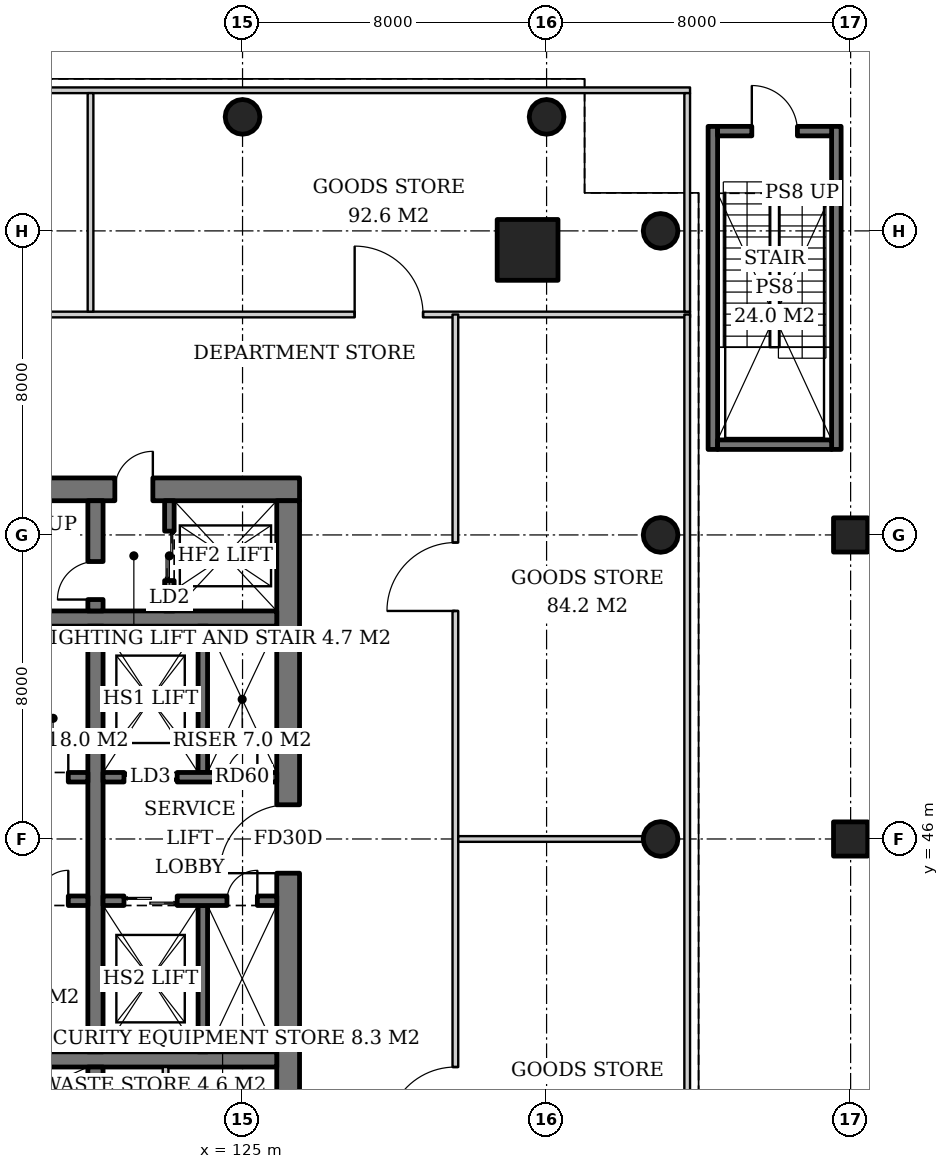
"""IFC4 building model, lengths in metres.
Left out: names, types, materials, properties, quantities, classifications, styles, units other than length and angle.
Written with IfcOpenShell. Run it as: python <this file> out.ifc"""

import sys

from ifc_helpers import new_model, si_unit, direction, frame, frame_2d, origin, origin_2d, place, context, subcontext, project, spatial, rectangle, hollow_circle, extrude, element, fill, save


model = new_model("IFC4")
c1 = context("Model", 3, precision=1e-05, world=origin(), true_north=direction((0.0, 1.0)))
c2 = subcontext(c1, "Body", "Model", "MODEL_VIEW")
j1 = project(units=[si_unit("LENGTHUNIT", "METRE"), si_unit("PLANEANGLEUNIT", "RADIAN")], contexts=[c1])
p1 = place(None, origin())
s1 = spatial("IfcSite", under=j1, at=p1, CompositionType="ELEMENT")
p2 = place(p1, origin())
s2 = spatial("IfcBuilding", under=s1, at=p2, CompositionType="ELEMENT")
p3 = place(p2, frame((0.0, 0.0, 6.0)))
s3 = spatial("IfcBuildingStorey", under=s2, at=p3, CompositionType="ELEMENT", Elevation=6.0)
for number, where, z_axis, x_axis in (
    (1, (141.0, 46.0, 0.0), (0.0, 0.0, 1.0), (1.0, 0.0, 0.0)),
    (2, (141.0, 54.0, 0.0), (0.0, 0.0, 1.0), (1.0, 0.0, 0.0)),
):
    element("IfcColumn", number, at=place(p3, frame(where, z_axis=z_axis, x_axis=x_axis)), inside=s3, PredefinedType="COLUMN", context=c2, shape_type="SweptSolid", body=[
        extrude(rectangle(XDim=0.9, YDim=0.9, at=origin_2d()), origin(), (0.0, 0.0, 1.0), 5.0),
    ])
p4 = place(p3, frame((132.5, 61.5, 0.0), z_axis=(0.0, 0.0, 1.0), x_axis=(1.0, 0.0, 0.0)))
e3 = element("IfcColumn", 3, at=p4, inside=s3, PredefinedType="COLUMN", context=c2, shape_type="SweptSolid", body=[
    extrude(rectangle(XDim=1.6, YDim=1.6, at=origin_2d()), origin(), (0.0, 0.0, 1.0), 5.0),
])
for number, where, z_axis, x_axis in (
    (4, (136.0, 62.0, 0.0), (0.0, 0.0, 1.0), (1.0, 0.0, 0.0)),
    (5, (136.0, 46.0, 0.0), (0.0, 0.0, 1.0), (1.0, 0.0, 0.0)),
    (6, (136.0, 54.0, 0.0), (0.0, 0.0, 1.0), (1.0, 0.0, 0.0)),
    (7, (133.0, 65.0, 0.0), (0.0, 0.0, 1.0), (1.0, 0.0, 0.0)),
    (8, (125.0, 65.0, 0.0), (0.0, 0.0, 1.0), (1.0, 0.0, 0.0)),
):
    element("IfcColumn", number, at=place(p3, frame(where, z_axis=z_axis, x_axis=x_axis)), inside=s3, PredefinedType="COLUMN", context=c2, shape_type="SweptSolid", body=[
        extrude(hollow_circle(Radius=0.457, WallThickness=0.03, at=origin_2d()), origin(), (0.0, 0.0, 1.0), 5.0),
    ])
p5 = place(p3, frame((107.5, 55.2, 0.0), z_axis=(0.0, 0.0, 1.0), x_axis=(1.0, 0.0, 0.0)))
e9 = element("IfcWall", 9, at=p5, inside=s3, PredefinedType="SHEAR", context=c2, shape_type="SweptSolid", body=[
    extrude(rectangle(XDim=19.0, YDim=0.6, at=frame_2d((9.5, 0.0))), origin(), (0.0, 0.0, 1.0), 5.0),
])
p6 = place(p5, frame((14.14, 0.0, 0.0)))
e10 = element("IfcOpeningElement", 10, at=p6, cuts=e9, PredefinedType="OPENING", context=c2, shape_type="SweptSolid", body=[
    extrude(rectangle(XDim=1.0, YDim=2.1, at=frame_2d((0.5, 1.05))), frame((0.0, 0.31, 0.0), z_axis=(0.0, -1.0, 0.0), x_axis=(1.0, 0.0, 0.0)), (0.0, 0.0, 1.0), 0.62),
])
p7 = place(p5, frame((2.425, 0.0, 0.0)))
e11 = element("IfcOpeningElement", 11, at=p7, cuts=e9, PredefinedType="OPENING", context=c2, shape_type="SweptSolid", body=[
    extrude(rectangle(XDim=1.0, YDim=2.1, at=frame_2d((0.5, 1.05))), frame((0.0, 0.31, 0.0), z_axis=(0.0, -1.0, 0.0), x_axis=(1.0, 0.0, 0.0)), (0.0, 0.0, 1.0), 0.62),
])
p8 = place(p3, frame((126.2, 37.1, 0.0), z_axis=(0.0, 0.0, 1.0), x_axis=(0.0, 1.0, 0.0)))
e12 = element("IfcWall", 12, at=p8, inside=s3, PredefinedType="SHEAR", context=c2, shape_type="SweptSolid", body=[
    extrude(rectangle(XDim=17.8, YDim=0.6, at=frame_2d((8.9, 0.0))), origin(), (0.0, 0.0, 1.0), 5.0),
])
p9 = place(p8, frame((8.0, 0.0, 0.0)))
e13 = element("IfcOpeningElement", 13, at=p9, cuts=e12, PredefinedType="OPENING", context=c2, shape_type="SweptSolid", body=[
    extrude(rectangle(XDim=1.8, YDim=2.4, at=frame_2d((0.9, 1.2))), frame((0.0, 0.31, 0.0), z_axis=(0.0, -1.0, 0.0), x_axis=(1.0, 0.0, 0.0)), (0.0, 0.0, 1.0), 0.62),
])
for number, where, z_axis, x_axis in (
    (14, (108.1, 40.2, 0.0), (0.0, 0.0, 1.0), (1.0, 0.0, 0.0)),
    (15, (108.1, 51.8, 0.0), (0.0, 0.0, 1.0), (1.0, 0.0, 0.0)),
):
    element("IfcWall", number, at=place(p3, frame(where, z_axis=z_axis, x_axis=x_axis)), inside=s3, PredefinedType="SHEAR", context=c2, shape_type="SweptSolid", body=[
        extrude(rectangle(XDim=17.8, YDim=0.4, at=frame_2d((8.9, 0.0))), origin(), (0.0, 0.0, 1.0), 5.0),
    ])
p10 = place(p3, frame((121.13, 37.1, 0.0), z_axis=(0.0, 0.0, 1.0), x_axis=(0.0, 1.0, 0.0)))
e16 = element("IfcWall", 16, at=p10, inside=s3, PredefinedType="SHEAR", context=c2, shape_type="SweptSolid", body=[
    extrude(rectangle(XDim=2.9, YDim=0.4, at=frame_2d((1.45, 0.0))), origin(), (0.0, 0.0, 1.0), 5.0),
])
p11 = place(p3, frame((121.13, 40.4, 0.0), z_axis=(0.0, 0.0, 1.0), x_axis=(0.0, 1.0, 0.0)))
e17 = element("IfcWall", 17, at=p11, inside=s3, PredefinedType="SHEAR", context=c2, shape_type="SweptSolid", body=[
    extrude(rectangle(XDim=11.2, YDim=0.4, at=frame_2d((5.6, 0.0))), origin(), (0.0, 0.0, 1.0), 5.0),
])
p12 = place(p3, frame((121.13, 52.0, 0.0), z_axis=(0.0, 0.0, 1.0), x_axis=(0.0, 1.0, 0.0)))
e18 = element("IfcWall", 18, at=p12, inside=s3, PredefinedType="SHEAR", context=c2, shape_type="SweptSolid", body=[
    extrude(rectangle(XDim=2.9, YDim=0.4, at=frame_2d((1.45, 0.0))), origin(), (0.0, 0.0, 1.0), 5.0),
])
p13 = place(p12, frame((0.3, 0.0, 0.0)))
e19 = element("IfcOpeningElement", 19, at=p13, cuts=e18, PredefinedType="OPENING", context=c2, shape_type="SweptSolid", body=[
    extrude(rectangle(XDim=1.0, YDim=2.1, at=frame_2d((0.5, 1.05))), frame((0.0, 0.21, 0.0), z_axis=(0.0, -1.0, 0.0), x_axis=(1.0, 0.0, 0.0)), (0.0, 0.0, 1.0), 0.42),
])
p14 = place(p3, frame((123.075, 52.0, 0.0), z_axis=(0.0, 0.0, 1.0), x_axis=(0.0, 1.0, 0.0)))
e20 = element("IfcWall", 20, at=p14, inside=s3, PredefinedType="SHEAR", context=c2, shape_type="SweptSolid", body=[
    extrude(rectangle(XDim=2.9, YDim=0.25, at=frame_2d((1.45, 0.0))), origin(), (0.0, 0.0, 1.0), 5.0),
])
p15 = place(p14, frame((0.8, 0.0, 0.0)))
e21 = element("IfcOpeningElement", 21, at=p15, cuts=e20, PredefinedType="OPENING", context=c2, shape_type="SweptSolid", body=[
    extrude(rectangle(XDim=1.3, YDim=2.2, at=frame_2d((0.65, 1.1))), frame((0.0, 0.135, 0.0), z_axis=(0.0, -1.0, 0.0), x_axis=(1.0, 0.0, 0.0)), (0.0, 0.0, 1.0), 0.27),
])
p16 = place(p3, frame((108.1, 47.625, 0.0), z_axis=(0.0, 0.0, 1.0), x_axis=(1.0, 0.0, 0.0)))
e22 = element("IfcWall", 22, at=p16, inside=s3, PredefinedType="SHEAR", context=c2, shape_type="SweptSolid", body=[
    extrude(rectangle(XDim=12.83, YDim=0.25, at=frame_2d((6.415, 0.0))), origin(), (0.0, 0.0, 1.0), 5.0),
])
p17 = place(p16, frame((11.515, 0.0, 0.0)))
e23 = element("IfcOpeningElement", 23, at=p17, cuts=e22, PredefinedType="OPENING", context=c2, shape_type="SweptSolid", body=[
    extrude(rectangle(XDim=0.8, YDim=2.0, at=frame_2d((0.4, 1.0))), frame((0.0, 0.135, 0.0), z_axis=(0.0, -1.0, 0.0), x_axis=(1.0, 0.0, 0.0)), (0.0, 0.0, 1.0), 0.27),
])
p18 = place(p3, frame((108.1, 44.375, 0.0), z_axis=(0.0, 0.0, 1.0), x_axis=(1.0, 0.0, 0.0)))
e24 = element("IfcWall", 24, at=p18, inside=s3, PredefinedType="SHEAR", context=c2, shape_type="SweptSolid", body=[
    extrude(rectangle(XDim=12.83, YDim=0.25, at=frame_2d((6.415, 0.0))), origin(), (0.0, 0.0, 1.0), 5.0),
])
p19 = place(p18, frame((9.0, 0.0, 0.0)))
e25 = element("IfcOpeningElement", 25, at=p19, cuts=e24, PredefinedType="OPENING", context=c2, shape_type="SweptSolid", body=[
    extrude(rectangle(XDim=1.0, YDim=2.1, at=frame_2d((0.5, 1.05))), frame((0.0, 0.135, 0.0), z_axis=(0.0, -1.0, 0.0), x_axis=(1.0, 0.0, 0.0)), (0.0, 0.0, 1.0), 0.27),
])
p20 = place(p18, frame((11.515, 0.0, 0.0)))
e26 = element("IfcOpeningElement", 26, at=p20, cuts=e24, PredefinedType="OPENING", context=c2, shape_type="SweptSolid", body=[
    extrude(rectangle(XDim=0.8, YDim=2.0, at=frame_2d((0.4, 1.0))), frame((0.0, 0.135, 0.0), z_axis=(0.0, -1.0, 0.0), x_axis=(1.0, 0.0, 0.0)), (0.0, 0.0, 1.0), 0.27),
])
p21 = place(p3, frame((123.955, 47.75, 0.0), z_axis=(0.0, 0.0, 1.0), x_axis=(0.0, 1.0, 0.0)))
e27 = element("IfcWall", 27, at=p21, inside=s3, PredefinedType="SHEAR", context=c2, shape_type="SweptSolid", body=[
    extrude(rectangle(XDim=3.85, YDim=0.25, at=frame_2d((1.925, 0.0))), origin(), (0.0, 0.0, 1.0), 5.0),
])
p22 = place(p3, frame((121.33, 47.625, 0.0), z_axis=(0.0, 0.0, 1.0), x_axis=(1.0, 0.0, 0.0)))
e28 = element("IfcWall", 28, at=p22, inside=s3, PredefinedType="SHEAR", context=c2, shape_type="SweptSolid", body=[
    extrude(rectangle(XDim=4.57, YDim=0.25, at=frame_2d((2.285, 0.0))), origin(), (0.0, 0.0, 1.0), 5.0),
])
p23 = place(p22, frame((0.55, 0.0, 0.0)))
e29 = element("IfcOpeningElement", 29, at=p23, cuts=e28, PredefinedType="OPENING", context=c2, shape_type="SweptSolid", body=[
    extrude(rectangle(XDim=1.4, YDim=2.4, at=frame_2d((0.7, 1.2))), frame((0.0, 0.135, 0.0), z_axis=(0.0, -1.0, 0.0), x_axis=(1.0, 0.0, 0.0)), (0.0, 0.0, 1.0), 0.27),
])
p24 = place(p22, frame((3.26, 0.0, 0.0)))
e30 = element("IfcOpeningElement", 30, at=p24, cuts=e28, PredefinedType="OPENING", context=c2, shape_type="SweptSolid", body=[
    extrude(rectangle(XDim=0.8, YDim=2.0, at=frame_2d((0.4, 1.0))), frame((0.0, 0.135, 0.0), z_axis=(0.0, -1.0, 0.0), x_axis=(1.0, 0.0, 0.0)), (0.0, 0.0, 1.0), 0.27),
])
p25 = place(p3, frame((123.955, 44.25, 0.0), z_axis=(0.0, 0.0, 1.0), x_axis=(0.0, -1.0, 0.0)))
e31 = element("IfcWall", 31, at=p25, inside=s3, PredefinedType="SHEAR", context=c2, shape_type="SweptSolid", body=[
    extrude(rectangle(XDim=3.85, YDim=0.25, at=frame_2d((1.925, 0.0))), origin(), (0.0, 0.0, 1.0), 5.0),
])
p26 = place(p3, frame((121.33, 44.375, 0.0), z_axis=(0.0, 0.0, 1.0), x_axis=(1.0, 0.0, 0.0)))
e32 = element("IfcWall", 32, at=p26, inside=s3, PredefinedType="SHEAR", context=c2, shape_type="SweptSolid", body=[
    extrude(rectangle(XDim=4.57, YDim=0.25, at=frame_2d((2.285, 0.0))), origin(), (0.0, 0.0, 1.0), 5.0),
])
p27 = place(p26, frame((0.55, 0.0, 0.0)))
e33 = element("IfcOpeningElement", 33, at=p27, cuts=e32, PredefinedType="OPENING", context=c2, shape_type="SweptSolid", body=[
    extrude(rectangle(XDim=1.4, YDim=2.4, at=frame_2d((0.7, 1.2))), frame((0.0, 0.135, 0.0), z_axis=(0.0, -1.0, 0.0), x_axis=(1.0, 0.0, 0.0)), (0.0, 0.0, 1.0), 0.27),
])
p28 = place(p26, frame((3.26, 0.0, 0.0)))
e34 = element("IfcOpeningElement", 34, at=p28, cuts=e32, PredefinedType="OPENING", context=c2, shape_type="SweptSolid", body=[
    extrude(rectangle(XDim=0.8, YDim=2.0, at=frame_2d((0.4, 1.0))), frame((0.0, 0.135, 0.0), z_axis=(0.0, -1.0, 0.0), x_axis=(1.0, 0.0, 0.0)), (0.0, 0.0, 1.0), 0.27),
])
p29 = place(p3, frame((122.975, 37.1, 0.0), z_axis=(0.0, 0.0, 1.0), x_axis=(0.0, 1.0, 0.0)))
e35 = element("IfcWall", 35, at=p29, inside=s3, PredefinedType="SOLIDWALL", context=c2, shape_type="SweptSolid", body=[
    extrude(rectangle(XDim=2.9, YDim=0.15, at=frame_2d((1.45, 0.0))), origin(), (0.0, 0.0, 1.0), 4.7),
])
for number, where, z_axis, x_axis in (
    (36, (137.375, 56.25, 0.0), (0.0, 0.0, 1.0), (0.0, 1.0, 0.0)),
    (37, (140.625, 56.25, 0.0), (0.0, 0.0, 1.0), (0.0, 1.0, 0.0)),
):
    element("IfcWall", number, at=place(p3, frame(where, z_axis=z_axis, x_axis=x_axis)), inside=s3, PredefinedType="SOLIDWALL", context=c2, shape_type="SweptSolid", body=[
        extrude(rectangle(XDim=8.5, YDim=0.25, at=frame_2d((4.25, 0.0))), origin(), (0.0, 0.0, 1.0), 4.7),
    ])
p30 = place(p3, frame((137.5, 56.375, 0.0), z_axis=(0.0, 0.0, 1.0), x_axis=(1.0, 0.0, 0.0)))
e38 = element("IfcWall", 38, at=p30, inside=s3, PredefinedType="SOLIDWALL", context=c2, shape_type="SweptSolid", body=[
    extrude(rectangle(XDim=3.0, YDim=0.25, at=frame_2d((1.5, 0.0))), origin(), (0.0, 0.0, 1.0), 4.7),
])
p31 = place(p3, frame((137.5, 64.625, 0.0), z_axis=(0.0, 0.0, 1.0), x_axis=(1.0, 0.0, 0.0)))
e39 = element("IfcWall", 39, at=p31, inside=s3, PredefinedType="SOLIDWALL", context=c2, shape_type="SweptSolid", body=[
    extrude(rectangle(XDim=3.0, YDim=0.25, at=frame_2d((1.5, 0.0))), origin(), (0.0, 0.0, 1.0), 4.7),
])
p32 = place(p31, frame((0.9, 0.0, 0.0)))
e40 = element("IfcOpeningElement", 40, at=p32, cuts=e39, PredefinedType="OPENING", context=c2, shape_type="SweptSolid", body=[
    extrude(rectangle(XDim=1.2, YDim=2.1, at=frame_2d((0.6, 1.05))), frame((0.0, 0.135, 0.0), z_axis=(0.0, -1.0, 0.0), x_axis=(1.0, 0.0, 0.0)), (0.0, 0.0, 1.0), 0.27),
])
p33 = place(p3, frame((97.225, 59.8, 0.0), z_axis=(0.0, 0.0, 1.0), x_axis=(1.0, 0.0, 0.0)))
e41 = element("IfcWall", 41, at=p33, inside=s3, PredefinedType="PARTITIONING", context=c2, shape_type="SweptSolid", body=[
    extrude(rectangle(XDim=39.55, YDim=0.15, at=frame_2d((19.775, 0.0))), origin(), (0.0, 0.0, 1.0), 3.9),
])
p34 = place(p33, frame((7.025, 0.0, 0.0)))
e42 = element("IfcOpeningElement", 42, at=p34, cuts=e41, PredefinedType="OPENING", context=c2, shape_type="SweptSolid", body=[
    extrude(rectangle(XDim=1.8, YDim=2.4, at=frame_2d((0.9, 1.2))), frame((0.0, 0.085, 0.0), z_axis=(0.0, -1.0, 0.0), x_axis=(1.0, 0.0, 0.0)), (0.0, 0.0, 1.0), 0.17),
])
p35 = place(p33, frame((18.875, 0.0, 0.0)))
e43 = element("IfcOpeningElement", 43, at=p35, cuts=e41, PredefinedType="OPENING", context=c2, shape_type="SweptSolid", body=[
    extrude(rectangle(XDim=1.8, YDim=2.4, at=frame_2d((0.9, 1.2))), frame((0.0, 0.085, 0.0), z_axis=(0.0, -1.0, 0.0), x_axis=(1.0, 0.0, 0.0)), (0.0, 0.0, 1.0), 0.17),
])
p36 = place(p33, frame((30.725, 0.0, 0.0)))
e44 = element("IfcOpeningElement", 44, at=p36, cuts=e41, PredefinedType="OPENING", context=c2, shape_type="SweptSolid", body=[
    extrude(rectangle(XDim=1.8, YDim=2.4, at=frame_2d((0.9, 1.2))), frame((0.0, 0.085, 0.0), z_axis=(0.0, -1.0, 0.0), x_axis=(1.0, 0.0, 0.0)), (0.0, 0.0, 1.0), 0.17),
])
p37 = place(p3, frame((97.225, 65.7, 0.0), z_axis=(0.0, 0.0, 1.0), x_axis=(1.0, 0.0, 0.0)))
e45 = element("IfcWall", 45, at=p37, inside=s3, PredefinedType="PARTITIONING", context=c2, shape_type="SweptSolid", body=[
    extrude(rectangle(XDim=39.55, YDim=0.15, at=frame_2d((19.775, 0.0))), origin(), (0.0, 0.0, 1.0), 4.7),
])
p38 = place(p3, frame((136.7, 59.875, 0.0), z_axis=(0.0, 0.0, 1.0), x_axis=(0.0, 1.0, 0.0)))
e46 = element("IfcWall", 46, at=p38, inside=s3, PredefinedType="PARTITIONING", context=c2, shape_type="SweptSolid", body=[
    extrude(rectangle(XDim=5.75, YDim=0.15, at=frame_2d((2.875, 0.0))), origin(), (0.0, 0.0, 1.0), 4.7),
])
p39 = place(p3, frame((121.0, 59.875, 0.0), z_axis=(0.0, 0.0, 1.0), x_axis=(0.0, 1.0, 0.0)))
e47 = element("IfcWall", 47, at=p39, inside=s3, PredefinedType="PARTITIONING", context=c2, shape_type="SweptSolid", body=[
    extrude(rectangle(XDim=5.75, YDim=0.15, at=frame_2d((2.875, 0.0))), origin(), (0.0, 0.0, 1.0), 4.15),
])
p40 = place(p3, frame((130.6, 32.2, 0.0), z_axis=(0.0, 0.0, 1.0), x_axis=(0.0, 1.0, 0.0)))
e48 = element("IfcWall", 48, at=p40, inside=s3, PredefinedType="PARTITIONING", context=c2, shape_type="SweptSolid", body=[
    extrude(rectangle(XDim=27.6, YDim=0.15, at=frame_2d((13.8, 0.0))), origin(), (0.0, 0.0, 1.0), 3.9),
])
p41 = place(p40, frame((6.0, 0.0, 0.0)))
e49 = element("IfcOpeningElement", 49, at=p41, cuts=e48, PredefinedType="OPENING", context=c2, shape_type="SweptSolid", body=[
    extrude(rectangle(XDim=1.8, YDim=2.4, at=frame_2d((0.9, 1.2))), frame((0.0, 0.085, 0.0), z_axis=(0.0, -1.0, 0.0), x_axis=(1.0, 0.0, 0.0)), (0.0, 0.0, 1.0), 0.17),
])
p42 = place(p40, frame((19.8, 0.0, 0.0)))
e50 = element("IfcOpeningElement", 50, at=p42, cuts=e48, PredefinedType="OPENING", context=c2, shape_type="SweptSolid", body=[
    extrude(rectangle(XDim=1.8, YDim=2.4, at=frame_2d((0.9, 1.2))), frame((0.0, 0.085, 0.0), z_axis=(0.0, -1.0, 0.0), x_axis=(1.0, 0.0, 0.0)), (0.0, 0.0, 1.0), 0.17),
])
p43 = place(p3, frame((136.7, 32.2, 0.0), z_axis=(0.0, 0.0, 1.0), x_axis=(0.0, 1.0, 0.0)))
e51 = element("IfcWall", 51, at=p43, inside=s3, PredefinedType="PARTITIONING", context=c2, shape_type="SweptSolid", body=[
    extrude(rectangle(XDim=27.6, YDim=0.15, at=frame_2d((13.8, 0.0))), origin(), (0.0, 0.0, 1.0), 4.7),
])
p44 = place(p3, frame((130.675, 46.0, 0.0), z_axis=(0.0, 0.0, 1.0), x_axis=(1.0, 0.0, 0.0)))
e52 = element("IfcWall", 52, at=p44, inside=s3, PredefinedType="PARTITIONING", context=c2, shape_type="SweptSolid", body=[
    extrude(rectangle(XDim=4.868, YDim=0.15, at=frame_2d((2.434, 0.0))), origin(), (0.0, 0.0, 1.0), 4.7),
])
p45 = place(p15, origin())
e53 = element("IfcDoor", 53, at=p45, inside=s3, OperationType="DOUBLE_DOOR_SLIDING", PredefinedType="DOOR", context=c2, shape_type="SweptSolid", body=[
    extrude(rectangle(XDim=1.3, YDim=2.2, at=frame_2d((0.65, 1.1))), frame((0.0, 0.025, 0.0), z_axis=(0.0, -1.0, 0.0), x_axis=(1.0, 0.0, 0.0)), (0.0, 0.0, 1.0), 0.05),
])
fill(e21, e53)
p46 = place(p17, origin())
e54 = element("IfcDoor", 54, at=p46, inside=s3, OperationType="SINGLE_SWING_RIGHT", PredefinedType="DOOR", context=c2, shape_type="SweptSolid", body=[
    extrude(rectangle(XDim=0.8, YDim=2.0, at=frame_2d((0.4, 1.0))), frame((0.0, 0.025, 0.0), z_axis=(0.0, -1.0, 0.0), x_axis=(1.0, 0.0, 0.0)), (0.0, 0.0, 1.0), 0.05),
])
fill(e23, e54)
p47 = place(p20, origin())
e55 = element("IfcDoor", 55, at=p47, inside=s3, OperationType="SINGLE_SWING_RIGHT", PredefinedType="DOOR", context=c2, shape_type="SweptSolid", body=[
    extrude(rectangle(XDim=0.8, YDim=2.0, at=frame_2d((0.4, 1.0))), frame((0.0, 0.025, 0.0), z_axis=(0.0, -1.0, 0.0), x_axis=(1.0, 0.0, 0.0)), (0.0, 0.0, 1.0), 0.05),
])
fill(e26, e55)
p48 = place(p23, origin())
e56 = element("IfcDoor", 56, at=p48, inside=s3, OperationType="DOUBLE_DOOR_SLIDING", PredefinedType="DOOR", context=c2, shape_type="SweptSolid", body=[
    extrude(rectangle(XDim=1.4, YDim=2.4, at=frame_2d((0.7, 1.2))), frame((0.0, 0.025, 0.0), z_axis=(0.0, -1.0, 0.0), x_axis=(1.0, 0.0, 0.0)), (0.0, 0.0, 1.0), 0.05),
])
fill(e29, e56)
p49 = place(p24, origin())
e57 = element("IfcDoor", 57, at=p49, inside=s3, OperationType="SINGLE_SWING_RIGHT", PredefinedType="DOOR", context=c2, shape_type="SweptSolid", body=[
    extrude(rectangle(XDim=0.8, YDim=2.0, at=frame_2d((0.4, 1.0))), frame((0.0, 0.025, 0.0), z_axis=(0.0, -1.0, 0.0), x_axis=(1.0, 0.0, 0.0)), (0.0, 0.0, 1.0), 0.05),
])
fill(e30, e57)
p50 = place(p27, origin())
e58 = element("IfcDoor", 58, at=p50, inside=s3, OperationType="DOUBLE_DOOR_SLIDING", PredefinedType="DOOR", context=c2, shape_type="SweptSolid", body=[
    extrude(rectangle(XDim=1.4, YDim=2.4, at=frame_2d((0.7, 1.2))), frame((0.0, 0.025, 0.0), z_axis=(0.0, -1.0, 0.0), x_axis=(1.0, 0.0, 0.0)), (0.0, 0.0, 1.0), 0.05),
])
fill(e33, e58)
p51 = place(p28, origin())
e59 = element("IfcDoor", 59, at=p51, inside=s3, OperationType="SINGLE_SWING_RIGHT", PredefinedType="DOOR", context=c2, shape_type="SweptSolid", body=[
    extrude(rectangle(XDim=0.8, YDim=2.0, at=frame_2d((0.4, 1.0))), frame((0.0, 0.025, 0.0), z_axis=(0.0, -1.0, 0.0), x_axis=(1.0, 0.0, 0.0)), (0.0, 0.0, 1.0), 0.05),
])
fill(e34, e59)
p52 = place(p13, origin())
e60 = element("IfcDoor", 60, at=p52, inside=s3, OperationType="SINGLE_SWING_LEFT", PredefinedType="DOOR", context=c2, shape_type="SweptSolid", body=[
    extrude(rectangle(XDim=1.0, YDim=2.1, at=frame_2d((0.5, 1.05))), frame((0.0, 0.025, 0.0), z_axis=(0.0, -1.0, 0.0), x_axis=(1.0, 0.0, 0.0)), (0.0, 0.0, 1.0), 0.05),
])
fill(e19, e60)
p53 = place(p6, origin())
e61 = element("IfcDoor", 61, at=p53, inside=s3, OperationType="SINGLE_SWING_RIGHT", PredefinedType="DOOR", context=c2, shape_type="SweptSolid", body=[
    extrude(rectangle(XDim=1.0, YDim=2.1, at=frame_2d((0.5, 1.05))), frame((0.0, 0.025, 0.0), z_axis=(0.0, -1.0, 0.0), x_axis=(1.0, 0.0, 0.0)), (0.0, 0.0, 1.0), 0.05),
])
fill(e10, e61)
p54 = place(p9, origin())
e62 = element("IfcDoor", 62, at=p54, inside=s3, OperationType="DOUBLE_DOOR_SINGLE_SWING", PredefinedType="DOOR", context=c2, shape_type="SweptSolid", body=[
    extrude(rectangle(XDim=1.8, YDim=2.4, at=frame_2d((0.9, 1.2))), frame((0.0, 0.025, 0.0), z_axis=(0.0, -1.0, 0.0), x_axis=(1.0, 0.0, 0.0)), (0.0, 0.0, 1.0), 0.05),
])
fill(e13, e62)
p55 = place(p32, origin())
e63 = element("IfcDoor", 63, at=p55, inside=s3, OperationType="SINGLE_SWING_LEFT", PredefinedType="DOOR", context=c2, shape_type="SweptSolid", body=[
    extrude(rectangle(XDim=1.2, YDim=2.1, at=frame_2d((0.6, 1.05))), frame((0.0, 0.025, 0.0), z_axis=(0.0, -1.0, 0.0), x_axis=(1.0, 0.0, 0.0)), (0.0, 0.0, 1.0), 0.05),
])
fill(e40, e63)
p56 = place(p36, origin())
e64 = element("IfcDoor", 64, at=p56, inside=s3, OperationType="DOUBLE_DOOR_SINGLE_SWING", PredefinedType="DOOR", context=c2, shape_type="SweptSolid", body=[
    extrude(rectangle(XDim=1.8, YDim=2.4, at=frame_2d((0.9, 1.2))), frame((0.0, 0.025, 0.0), z_axis=(0.0, -1.0, 0.0), x_axis=(1.0, 0.0, 0.0)), (0.0, 0.0, 1.0), 0.05),
])
fill(e44, e64)
p57 = place(p41, origin())
e65 = element("IfcDoor", 65, at=p57, inside=s3, OperationType="DOUBLE_DOOR_SINGLE_SWING", PredefinedType="DOOR", context=c2, shape_type="SweptSolid", body=[
    extrude(rectangle(XDim=1.8, YDim=2.4, at=frame_2d((0.9, 1.2))), frame((0.0, 0.025, 0.0), z_axis=(0.0, -1.0, 0.0), x_axis=(1.0, 0.0, 0.0)), (0.0, 0.0, 1.0), 0.05),
])
fill(e49, e65)
p58 = place(p42, origin())
e66 = element("IfcDoor", 66, at=p58, inside=s3, OperationType="DOUBLE_DOOR_SINGLE_SWING", PredefinedType="DOOR", context=c2, shape_type="SweptSolid", body=[
    extrude(rectangle(XDim=1.8, YDim=2.4, at=frame_2d((0.9, 1.2))), frame((0.0, 0.025, 0.0), z_axis=(0.0, -1.0, 0.0), x_axis=(1.0, 0.0, 0.0)), (0.0, 0.0, 1.0), 0.05),
])
fill(e50, e66)
save(model, sys.argv[1])
